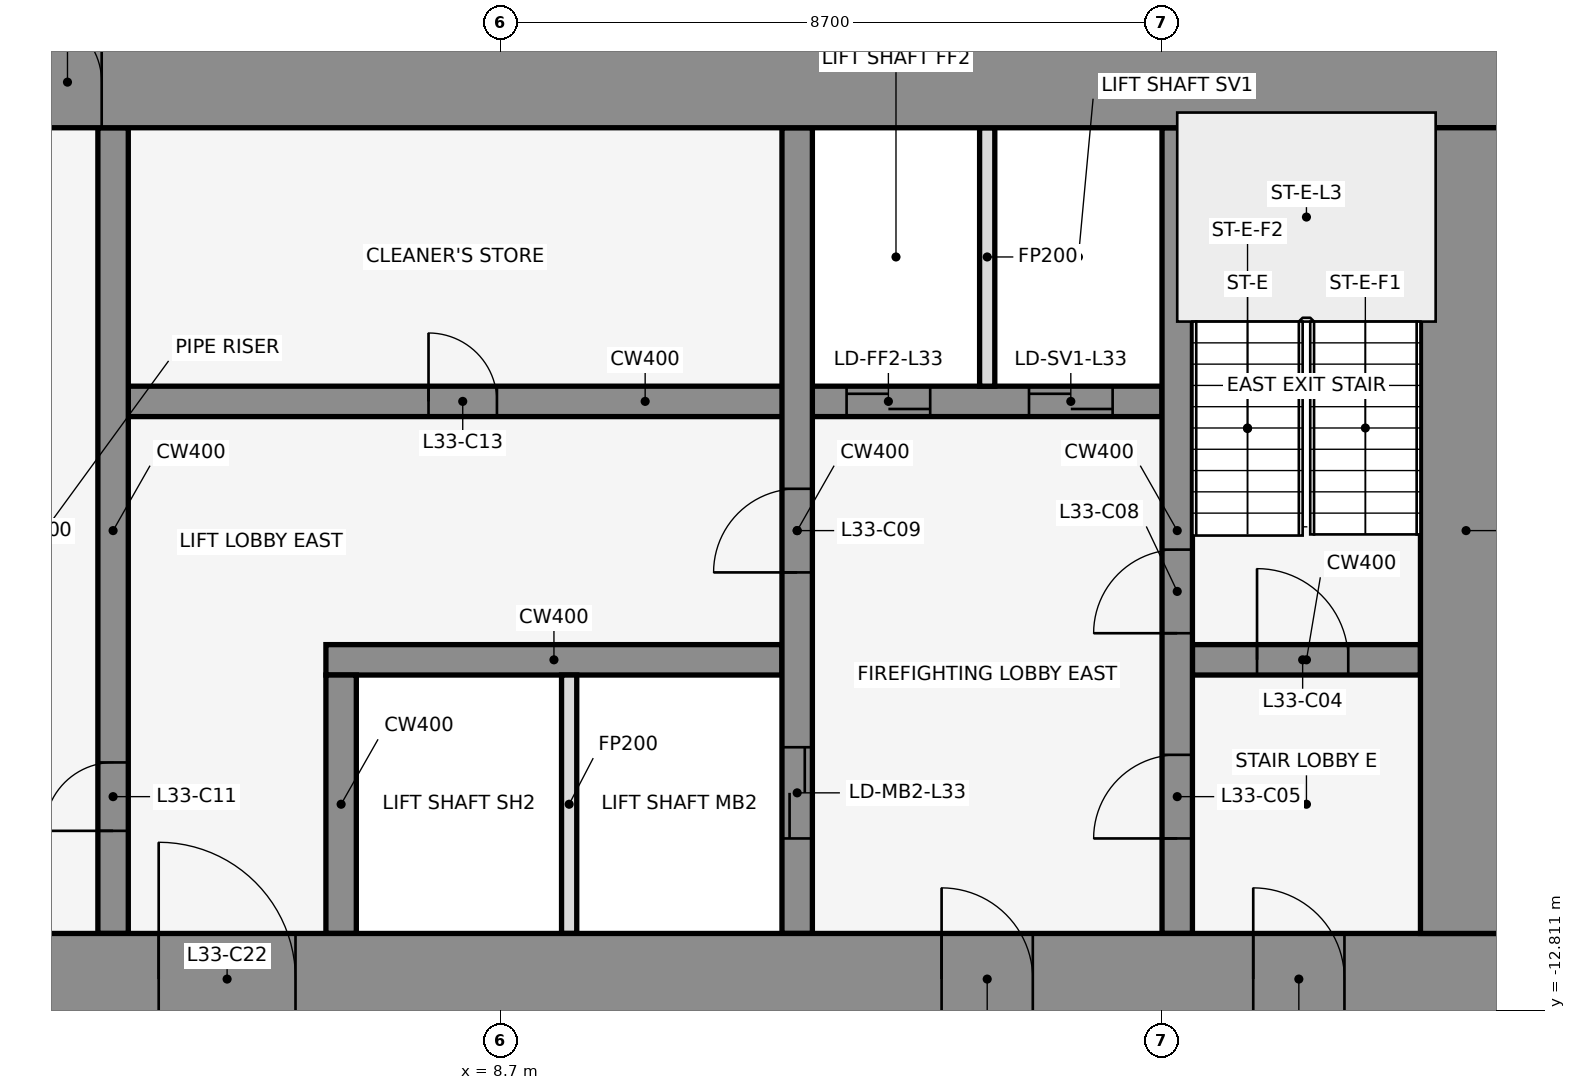
"""IFC4 building model, lengths in metres.
Left out: names, types, materials, properties, quantities, classifications, styles, units other than length and angle.
Written with IfcOpenShell. Run it as: python <this file> out.ifc"""

import sys

from ifc_helpers import new_model, si_unit, direction, frame, frame_2d, origin, place, context, subcontext, project, spatial, rectangle, extrude, element, fill, save


model = new_model("IFC4")
c1 = context("Model", 3, precision=1e-05, world=origin(), true_north=direction((0.0, 1.0)))
c2 = subcontext(c1, "Body", "Model", "MODEL_VIEW")
j1 = project(units=[si_unit("LENGTHUNIT", "METRE"), si_unit("PLANEANGLEUNIT", "RADIAN")], contexts=[c1])
p1 = place(None, origin())
s1 = spatial("IfcSite", under=j1, at=p1, CompositionType="ELEMENT")
p2 = place(p1, origin())
s2 = spatial("IfcBuilding", under=s1, at=p2, CompositionType="ELEMENT")
p3 = place(p2, frame((0.0, 0.0, 152.7)))
s3 = spatial("IfcBuildingStorey", under=s2, at=p3, CompositionType="ELEMENT", Elevation=152.7)
p4 = place(p3, frame((16.432, -0.105, 0.0), z_axis=(0.0, 0.0, 1.0), x_axis=(-0.83981312244, 0.542875602121, 0.0)))
e1 = element("IfcWall", 1, at=p4, inside=s3, PredefinedType="STANDARD", context=c2, shape_type="SweptSolid", body=[
    extrude(rectangle(XDim=2.183, YDim=0.25, at=frame_2d((1.091, 0.0))), origin(), (0.0, 0.0, 1.0), 3.95),
])
p5 = place(p3, frame((6.4, -8.2, 0.0), z_axis=(0.0, 0.0, 1.0), x_axis=(1.0, 0.0, 0.0)))
e2 = element("IfcWall", 2, at=p5, inside=s3, PredefinedType="SHEAR", context=c2, shape_type="SweptSolid", body=[
    extrude(rectangle(XDim=6.0, YDim=0.4, at=frame_2d((3.0, 0.0))), origin(), (0.0, 0.0, 1.0), 4.1),
])
p6 = place(p3, frame((17.8, -8.2, 0.0), z_axis=(0.0, 0.0, 1.0), x_axis=(1.0, 0.0, 0.0)))
e3 = element("IfcWall", 3, at=p6, inside=s3, PredefinedType="SHEAR", context=c2, shape_type="SweptSolid", body=[
    extrude(rectangle(XDim=3.0, YDim=0.4, at=frame_2d((1.5, 0.0))), origin(), (0.0, 0.0, 1.0), 4.1),
])
p7 = place(p6, frame((0.85, 0.0, 0.0)))
e4 = element("IfcOpeningElement", 4, at=p7, cuts=e3, PredefinedType="OPENING", context=c2, shape_type="SweptSolid", body=[
    extrude(rectangle(XDim=1.2, YDim=2.1, at=frame_2d((0.6, 1.05))), frame((0.0, 0.212, 0.0), z_axis=(0.0, -1.0, 0.0), x_axis=(1.0, 0.0, 0.0)), (0.0, 0.0, 1.0), 0.424),
])
p8 = place(p3, frame((3.8, -4.8, 0.0), z_axis=(0.0, 0.0, 1.0), x_axis=(1.0, 0.0, 0.0)))
e5 = element("IfcWall", 5, at=p8, inside=s3, PredefinedType="SHEAR", context=c2, shape_type="SweptSolid", body=[
    extrude(rectangle(XDim=13.6, YDim=0.4, at=frame_2d((6.8, 0.0))), origin(), (0.0, 0.0, 1.0), 4.1),
])
p9 = place(p8, frame((9.45, 0.0, 0.0)))
e6 = element("IfcOpeningElement", 6, at=p9, cuts=e5, PredefinedType="OPENING", context=c2, shape_type="SweptSolid", body=[
    extrude(rectangle(XDim=1.1, YDim=2.1, at=frame_2d((0.55, 1.05))), frame((0.0, 0.212, 0.0), z_axis=(0.0, -1.0, 0.0), x_axis=(1.0, 0.0, 0.0)), (0.0, 0.0, 1.0), 0.424),
])
p10 = place(p8, frame((11.85, 0.0, 0.0)))
e7 = element("IfcOpeningElement", 7, at=p10, cuts=e5, PredefinedType="OPENING", context=c2, shape_type="SweptSolid", body=[
    extrude(rectangle(XDim=1.1, YDim=2.1, at=frame_2d((0.55, 1.05))), frame((0.0, 0.212, 0.0), z_axis=(0.0, -1.0, 0.0), x_axis=(1.0, 0.0, 0.0)), (0.0, 0.0, 1.0), 0.424),
])
p11 = place(p8, frame((3.95, 0.0, 0.0)))
e8 = element("IfcOpeningElement", 8, at=p11, cuts=e5, PredefinedType="OPENING", context=c2, shape_type="SweptSolid", body=[
    extrude(rectangle(XDim=0.9, YDim=2.1, at=frame_2d((0.45, 1.05))), frame((0.0, 0.212, 0.0), z_axis=(0.0, -1.0, 0.0), x_axis=(1.0, 0.0, 0.0)), (0.0, 0.0, 1.0), 0.424),
])
p12 = place(p3, frame((3.6, -11.8, 0.0), z_axis=(0.0, 0.0, 1.0), x_axis=(0.0, 1.0, 0.0)))
e9 = element("IfcWall", 9, at=p12, inside=s3, PredefinedType="SHEAR", context=c2, shape_type="SweptSolid", body=[
    extrude(rectangle(XDim=10.6, YDim=0.4, at=frame_2d((5.3, 0.0))), origin(), (0.0, 0.0, 1.0), 4.1),
])
p13 = place(p12, frame((1.35, 0.0, 0.0)))
e10 = element("IfcOpeningElement", 10, at=p13, cuts=e9, PredefinedType="OPENING", context=c2, shape_type="SweptSolid", body=[
    extrude(rectangle(XDim=0.9, YDim=2.1, at=frame_2d((0.45, 1.05))), frame((0.0, 0.212, 0.0), z_axis=(0.0, -1.0, 0.0), x_axis=(1.0, 0.0, 0.0)), (0.0, 0.0, 1.0), 0.424),
])
p14 = place(p3, frame((6.6, -11.8, 0.0), z_axis=(0.0, 0.0, 1.0), x_axis=(0.0, 1.0, 0.0)))
e11 = element("IfcWall", 11, at=p14, inside=s3, PredefinedType="SHEAR", context=c2, shape_type="SweptSolid", body=[
    extrude(rectangle(XDim=3.4, YDim=0.4, at=frame_2d((1.7, 0.0))), origin(), (0.0, 0.0, 1.0), 4.1),
])
p15 = place(p3, frame((9.6, -11.8, 0.0), z_axis=(0.0, 0.0, 1.0), x_axis=(0.0, 1.0, 0.0)))
e12 = element("IfcWall", 12, at=p15, inside=s3, PredefinedType="PARTITIONING", context=c2, shape_type="SweptSolid", body=[
    extrude(rectangle(XDim=3.4, YDim=0.2, at=frame_2d((1.7, 0.0))), origin(), (0.0, 0.0, 1.0), 2.84),
])
p16 = place(p3, frame((12.6, -11.8, 0.0), z_axis=(0.0, 0.0, 1.0), x_axis=(0.0, 1.0, 0.0)))
e13 = element("IfcWall", 13, at=p16, inside=s3, PredefinedType="SHEAR", context=c2, shape_type="SweptSolid", body=[
    extrude(rectangle(XDim=10.6, YDim=0.4, at=frame_2d((5.3, 0.0))), origin(), (0.0, 0.0, 1.0), 4.1),
])
p17 = place(p16, frame((1.25, 0.0, 0.0)))
e14 = element("IfcOpeningElement", 14, at=p17, cuts=e13, PredefinedType="OPENING", context=c2, shape_type="SweptSolid", body=[
    extrude(rectangle(XDim=1.2, YDim=2.1, at=frame_2d((0.6, 1.05))), frame((0.0, 0.212, 0.0), z_axis=(0.0, -1.0, 0.0), x_axis=(1.0, 0.0, 0.0)), (0.0, 0.0, 1.0), 0.424),
])
p18 = place(p16, frame((4.75, 0.0, 0.0)))
e15 = element("IfcOpeningElement", 15, at=p18, cuts=e13, PredefinedType="OPENING", context=c2, shape_type="SweptSolid", body=[
    extrude(rectangle(XDim=1.1, YDim=2.1, at=frame_2d((0.55, 1.05))), frame((0.0, 0.212, 0.0), z_axis=(0.0, -1.0, 0.0), x_axis=(1.0, 0.0, 0.0)), (0.0, 0.0, 1.0), 0.424),
])
p19 = place(p3, frame((15.1, -4.6, 0.0), z_axis=(0.0, 0.0, 1.0), x_axis=(0.0, 1.0, 0.0)))
e16 = element("IfcWall", 16, at=p19, inside=s3, PredefinedType="PARTITIONING", context=c2, shape_type="SweptSolid", body=[
    extrude(rectangle(XDim=3.4, YDim=0.2, at=frame_2d((1.7, 0.0))), origin(), (0.0, 0.0, 1.0), 2.84),
])
p20 = place(p3, frame((17.6, -11.8, 0.0), z_axis=(0.0, 0.0, 1.0), x_axis=(0.0, 1.0, 0.0)))
e17 = element("IfcWall", 17, at=p20, inside=s3, PredefinedType="SHEAR", context=c2, shape_type="SweptSolid", body=[
    extrude(rectangle(XDim=10.6, YDim=0.4, at=frame_2d((5.3, 0.0))), origin(), (0.0, 0.0, 1.0), 4.1),
])
p21 = place(p20, frame((1.25, 0.0, 0.0)))
e18 = element("IfcOpeningElement", 18, at=p21, cuts=e17, PredefinedType="OPENING", context=c2, shape_type="SweptSolid", body=[
    extrude(rectangle(XDim=1.1, YDim=2.1, at=frame_2d((0.55, 1.05))), frame((0.0, 0.212, 0.0), z_axis=(0.0, -1.0, 0.0), x_axis=(1.0, 0.0, 0.0)), (0.0, 0.0, 1.0), 0.424),
])
p22 = place(p20, frame((3.95, 0.0, 0.0)))
e19 = element("IfcOpeningElement", 19, at=p22, cuts=e17, PredefinedType="OPENING", context=c2, shape_type="SweptSolid", body=[
    extrude(rectangle(XDim=1.1, YDim=2.1, at=frame_2d((0.55, 1.05))), frame((0.0, 0.212, 0.0), z_axis=(0.0, -1.0, 0.0), x_axis=(1.0, 0.0, 0.0)), (0.0, 0.0, 1.0), 0.424),
])
p23 = place(p3, frame((-22.0, -0.6, 0.0), z_axis=(0.0, 0.0, 1.0), x_axis=(1.0, 0.0, 0.0)))
e20 = element("IfcWall", 20, at=p23, inside=s3, PredefinedType="SHEAR", context=c2, shape_type="SweptSolid", body=[
    extrude(rectangle(XDim=44.0, YDim=1.2, at=frame_2d((22.0, 0.0))), origin(), (0.0, 0.0, 1.0), 4.1),
])
p24 = place(p23, frame((18.55, 0.0, 0.0)))
e21 = element("IfcOpeningElement", 21, at=p24, cuts=e20, PredefinedType="OPENING", context=c2, shape_type="SweptSolid", body=[
    extrude(rectangle(XDim=0.9, YDim=2.1, at=frame_2d((0.45, 1.05))), frame((0.0, 0.612, 0.0), z_axis=(0.0, -1.0, 0.0), x_axis=(1.0, 0.0, 0.0)), (0.0, 0.0, 1.0), 1.224),
])
p25 = place(p23, frame((24.55, 0.0, 0.0)))
e22 = element("IfcOpeningElement", 22, at=p25, cuts=e20, PredefinedType="OPENING", context=c2, shape_type="SweptSolid", body=[
    extrude(rectangle(XDim=0.9, YDim=2.1, at=frame_2d((0.45, 1.05))), frame((0.0, 0.612, 0.0), z_axis=(0.0, -1.0, 0.0), x_axis=(1.0, 0.0, 0.0)), (0.0, 0.0, 1.0), 1.224),
])
p26 = place(p3, frame((-22.0, -12.4, 0.0), z_axis=(0.0, 0.0, 1.0), x_axis=(1.0, 0.0, 0.0)))
e23 = element("IfcWall", 23, at=p26, inside=s3, PredefinedType="SHEAR", context=c2, shape_type="SweptSolid", body=[
    extrude(rectangle(XDim=44.0, YDim=1.2, at=frame_2d((22.0, 0.0))), origin(), (0.0, 0.0, 1.0), 4.1),
])
p27 = place(p26, frame((2.2, 0.0, 0.0)))
e24 = element("IfcOpeningElement", 24, at=p27, cuts=e23, PredefinedType="OPENING", context=c2, shape_type="SweptSolid", body=[
    extrude(rectangle(XDim=1.2, YDim=2.1, at=frame_2d((0.6, 1.05))), frame((0.0, 0.612, 0.0), z_axis=(0.0, -1.0, 0.0), x_axis=(1.0, 0.0, 0.0)), (0.0, 0.0, 1.0), 1.224),
])
p28 = place(p26, frame((21.4, 0.0, 0.0)))
e25 = element("IfcOpeningElement", 25, at=p28, cuts=e23, PredefinedType="OPENING", context=c2, shape_type="SweptSolid", body=[
    extrude(rectangle(XDim=1.2, YDim=2.1, at=frame_2d((0.6, 1.05))), frame((0.0, 0.612, 0.0), z_axis=(0.0, -1.0, 0.0), x_axis=(1.0, 0.0, 0.0)), (0.0, 0.0, 1.0), 1.224),
])
p29 = place(p26, frame((40.6, 0.0, 0.0)))
e26 = element("IfcOpeningElement", 26, at=p29, cuts=e23, PredefinedType="OPENING", context=c2, shape_type="SweptSolid", body=[
    extrude(rectangle(XDim=1.2, YDim=2.1, at=frame_2d((0.6, 1.05))), frame((0.0, 0.612, 0.0), z_axis=(0.0, -1.0, 0.0), x_axis=(1.0, 0.0, 0.0)), (0.0, 0.0, 1.0), 1.224),
])
p30 = place(p26, frame((16.0, 0.0, 0.0)))
e27 = element("IfcOpeningElement", 27, at=p30, cuts=e23, PredefinedType="OPENING", context=c2, shape_type="SweptSolid", body=[
    extrude(rectangle(XDim=1.8, YDim=2.1, at=frame_2d((0.9, 1.05))), frame((0.0, 0.612, 0.0), z_axis=(0.0, -1.0, 0.0), x_axis=(1.0, 0.0, 0.0)), (0.0, 0.0, 1.0), 1.224),
])
p31 = place(p26, frame((6.3, 0.0, 0.0)))
e28 = element("IfcOpeningElement", 28, at=p31, cuts=e23, PredefinedType="OPENING", context=c2, shape_type="SweptSolid", body=[
    extrude(rectangle(XDim=1.2, YDim=2.1, at=frame_2d((0.6, 1.05))), frame((0.0, 0.612, 0.0), z_axis=(0.0, -1.0, 0.0), x_axis=(1.0, 0.0, 0.0)), (0.0, 0.0, 1.0), 1.224),
])
p32 = place(p26, frame((26.2, 0.0, 0.0)))
e29 = element("IfcOpeningElement", 29, at=p32, cuts=e23, PredefinedType="OPENING", context=c2, shape_type="SweptSolid", body=[
    extrude(rectangle(XDim=1.8, YDim=2.1, at=frame_2d((0.9, 1.05))), frame((0.0, 0.612, 0.0), z_axis=(0.0, -1.0, 0.0), x_axis=(1.0, 0.0, 0.0)), (0.0, 0.0, 1.0), 1.224),
])
p33 = place(p26, frame((36.5, 0.0, 0.0)))
e30 = element("IfcOpeningElement", 30, at=p33, cuts=e23, PredefinedType="OPENING", context=c2, shape_type="SweptSolid", body=[
    extrude(rectangle(XDim=1.2, YDim=2.1, at=frame_2d((0.6, 1.05))), frame((0.0, 0.612, 0.0), z_axis=(0.0, -1.0, 0.0), x_axis=(1.0, 0.0, 0.0)), (0.0, 0.0, 1.0), 1.224),
])
p34 = place(p3, frame((21.4, -11.8, 0.0), z_axis=(0.0, 0.0, 1.0), x_axis=(0.0, 1.0, 0.0)))
e31 = element("IfcWall", 31, at=p34, inside=s3, PredefinedType="SHEAR", context=c2, shape_type="SweptSolid", body=[
    extrude(rectangle(XDim=10.6, YDim=1.2, at=frame_2d((5.3, 0.0))), origin(), (0.0, 0.0, 1.0), 4.1),
])
p35 = place(p7, origin())
e32 = element("IfcDoor", 32, at=p35, inside=s3, OperationType="SINGLE_SWING_RIGHT", PredefinedType="DOOR", context=c2, shape_type="SweptSolid", body=[
    extrude(rectangle(XDim=1.2, YDim=2.1, at=frame_2d((0.6, 1.05))), frame((0.0, 0.025, 0.0), z_axis=(0.0, -1.0, 0.0), x_axis=(1.0, 0.0, 0.0)), (0.0, 0.0, 1.0), 0.05),
])
fill(e4, e32)
p36 = place(p21, origin())
e33 = element("IfcDoor", 33, at=p36, inside=s3, OperationType="SINGLE_SWING_LEFT", PredefinedType="DOOR", context=c2, shape_type="SweptSolid", body=[
    extrude(rectangle(XDim=1.1, YDim=2.1, at=frame_2d((0.55, 1.05))), frame((0.0, 0.025, 0.0), z_axis=(0.0, -1.0, 0.0), x_axis=(1.0, 0.0, 0.0)), (0.0, 0.0, 1.0), 0.05),
])
fill(e18, e33)
p37 = place(p17, origin())
e34 = element("IfcDoor", 34, at=p37, inside=s3, OperationType="DOUBLE_DOOR_SLIDING", PredefinedType="DOOR", context=c2, shape_type="SweptSolid", body=[
    extrude(rectangle(XDim=1.2, YDim=2.1, at=frame_2d((0.6, 1.05))), frame((0.0, 0.025, 0.0), z_axis=(0.0, -1.0, 0.0), x_axis=(1.0, 0.0, 0.0)), (0.0, 0.0, 1.0), 0.05),
])
fill(e14, e34)
p38 = place(p9, origin())
e35 = element("IfcDoor", 35, at=p38, inside=s3, OperationType="DOUBLE_DOOR_SLIDING", PredefinedType="DOOR", context=c2, shape_type="SweptSolid", body=[
    extrude(rectangle(XDim=1.1, YDim=2.1, at=frame_2d((0.55, 1.05))), frame((0.0, 0.025, 0.0), z_axis=(0.0, -1.0, 0.0), x_axis=(1.0, 0.0, 0.0)), (0.0, 0.0, 1.0), 0.05),
])
fill(e6, e35)
p39 = place(p10, origin())
e36 = element("IfcDoor", 36, at=p39, inside=s3, OperationType="DOUBLE_DOOR_SLIDING", PredefinedType="DOOR", context=c2, shape_type="SweptSolid", body=[
    extrude(rectangle(XDim=1.1, YDim=2.1, at=frame_2d((0.55, 1.05))), frame((0.0, 0.025, 0.0), z_axis=(0.0, -1.0, 0.0), x_axis=(1.0, 0.0, 0.0)), (0.0, 0.0, 1.0), 0.05),
])
fill(e7, e36)
p40 = place(p22, origin())
e37 = element("IfcDoor", 37, at=p40, inside=s3, OperationType="SINGLE_SWING_RIGHT", PredefinedType="DOOR", context=c2, shape_type="SweptSolid", body=[
    extrude(rectangle(XDim=1.1, YDim=2.1, at=frame_2d((0.55, 1.05))), frame((0.0, 0.025, 0.0), z_axis=(0.0, -1.0, 0.0), x_axis=(1.0, 0.0, 0.0)), (0.0, 0.0, 1.0), 0.05),
])
fill(e19, e37)
p41 = place(p18, frame((1.1, 0.0, 0.0), z_axis=(0.0, 0.0, 1.0), x_axis=(-1.0, 0.0, 0.0)))
e38 = element("IfcDoor", 38, at=p41, inside=s3, OperationType="SINGLE_SWING_RIGHT", PredefinedType="DOOR", context=c2, shape_type="SweptSolid", body=[
    extrude(rectangle(XDim=1.1, YDim=2.1, at=frame_2d((0.55, 1.05))), frame((0.0, 0.025, 0.0), z_axis=(0.0, -1.0, 0.0), x_axis=(1.0, 0.0, 0.0)), (0.0, 0.0, 1.0), 0.05),
])
fill(e15, e38)
p42 = place(p13, origin())
e39 = element("IfcDoor", 39, at=p42, inside=s3, OperationType="SINGLE_SWING_LEFT", PredefinedType="DOOR", context=c2, shape_type="SweptSolid", body=[
    extrude(rectangle(XDim=0.9, YDim=2.1, at=frame_2d((0.45, 1.05))), frame((0.0, 0.025, 0.0), z_axis=(0.0, -1.0, 0.0), x_axis=(1.0, 0.0, 0.0)), (0.0, 0.0, 1.0), 0.05),
])
fill(e10, e39)
p43 = place(p11, origin())
e40 = element("IfcDoor", 40, at=p43, inside=s3, OperationType="SINGLE_SWING_LEFT", PredefinedType="DOOR", context=c2, shape_type="SweptSolid", body=[
    extrude(rectangle(XDim=0.9, YDim=2.1, at=frame_2d((0.45, 1.05))), frame((0.0, 0.025, 0.0), z_axis=(0.0, -1.0, 0.0), x_axis=(1.0, 0.0, 0.0)), (0.0, 0.0, 1.0), 0.05),
])
fill(e8, e40)
p44 = place(p25, origin())
e41 = element("IfcDoor", 41, at=p44, inside=s3, OperationType="SINGLE_SWING_LEFT", PredefinedType="DOOR", context=c2, shape_type="SweptSolid", body=[
    extrude(rectangle(XDim=0.9, YDim=2.1, at=frame_2d((0.45, 1.05))), frame((0.0, 0.025, 0.0), z_axis=(0.0, -1.0, 0.0), x_axis=(1.0, 0.0, 0.0)), (0.0, 0.0, 1.0), 0.05),
])
fill(e22, e41)
p45 = place(p29, frame((1.2, 0.0, 0.0), z_axis=(0.0, 0.0, 1.0), x_axis=(-1.0, 0.0, 0.0)))
e42 = element("IfcDoor", 42, at=p45, inside=s3, OperationType="SINGLE_SWING_RIGHT", PredefinedType="DOOR", context=c2, shape_type="SweptSolid", body=[
    extrude(rectangle(XDim=1.2, YDim=2.1, at=frame_2d((0.6, 1.05))), frame((0.0, 0.025, 0.0), z_axis=(0.0, -1.0, 0.0), x_axis=(1.0, 0.0, 0.0)), (0.0, 0.0, 1.0), 0.05),
])
fill(e26, e42)
p46 = place(p32, origin())
e43 = element("IfcDoor", 43, at=p46, inside=s3, OperationType="SINGLE_SWING_LEFT", PredefinedType="DOOR", context=c2, shape_type="SweptSolid", body=[
    extrude(rectangle(XDim=1.8, YDim=2.1, at=frame_2d((0.9, 1.05))), frame((0.0, 0.025, 0.0), z_axis=(0.0, -1.0, 0.0), x_axis=(1.0, 0.0, 0.0)), (0.0, 0.0, 1.0), 0.05),
])
fill(e29, e43)
p47 = place(p33, frame((1.2, 0.0, 0.0), z_axis=(0.0, 0.0, 1.0), x_axis=(-1.0, 0.0, 0.0)))
e44 = element("IfcDoor", 44, at=p47, inside=s3, OperationType="SINGLE_SWING_RIGHT", PredefinedType="DOOR", context=c2, shape_type="SweptSolid", body=[
    extrude(rectangle(XDim=1.2, YDim=2.1, at=frame_2d((0.6, 1.05))), frame((0.0, 0.025, 0.0), z_axis=(0.0, -1.0, 0.0), x_axis=(1.0, 0.0, 0.0)), (0.0, 0.0, 1.0), 0.05),
])
fill(e30, e44)
save(model, sys.argv[1])
